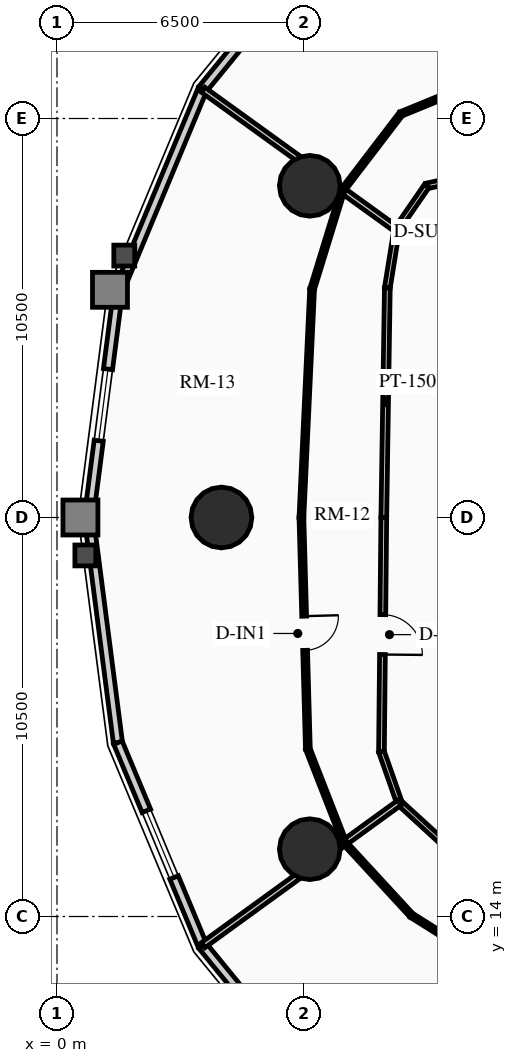
"""IFC4 building model, lengths in metres.
Left out: names, types, materials, properties, quantities, classifications, styles, units other than length and angle.
Written with IfcOpenShell. Run it as: python <this file> out.ifc"""

import sys

from ifc_helpers import new_model, si_unit, direction, frame, frame_2d, origin, origin_2d, place, context, subcontext, project, spatial, rectangle, circle, extrude, source, transform, mapped, element, fill, save


model = new_model("IFC4")
c1 = context("Model", 3, precision=1e-05, world=origin(), true_north=direction((0.0, 1.0)))
c2 = subcontext(c1, "Body", "Model", "MODEL_VIEW")
j1 = project(units=[si_unit("LENGTHUNIT", "METRE"), si_unit("PLANEANGLEUNIT", "RADIAN")], contexts=[c1])
p1 = place(None, origin())
s1 = spatial("IfcSite", under=j1, at=p1, CompositionType="ELEMENT")
p2 = place(p1, origin())
s2 = spatial("IfcBuilding", under=s1, at=p2, CompositionType="ELEMENT")
p3 = place(p2, frame((0.0, 0.0, 56.92)))
s3 = spatial("IfcBuildingStorey", under=s2, at=p3, CompositionType="ELEMENT", Elevation=56.92)
for number, where, z_axis, x_axis in (
    (1, (6.653, 33.229, 0.0), (0.0, 0.0, 1.0), (1.0, 0.0, 0.0)),
    (2, (4.328, 24.5, 0.0), (0.0, 0.0, 1.0), (1.0, 0.0, 0.0)),
    (3, (6.653, 15.771, 0.0), (0.0, 0.0, 1.0), (1.0, 0.0, 0.0)),
):
    element("IfcColumn", number, at=place(p3, frame(where, z_axis=z_axis, x_axis=x_axis)), inside=s3, PredefinedType="USERDEFINED", context=c2, shape_type="SweptSolid", body=[
        extrude(circle(Radius=0.8, at=origin_2d()), origin(), (0.0, 0.0, 1.0), 2.91),
    ])
p4 = place(p3, frame((3.828, 35.768, 0.0), z_axis=(0.0, 0.0, 1.0), x_axis=(0.632713287022, 0.77438614168, 0.0)))
e4 = element("IfcWall", 4, at=p4, inside=s3, PredefinedType="SOLIDWALL", context=c2, shape_type="SweptSolid", body=[
    extrude(rectangle(XDim=5.477, YDim=0.24, at=frame_2d((2.738, 0.0))), origin(), (0.0, 0.0, 1.0), 2.073),
])
m1 = source(origin(), c2, "Body", "SweptSolid", [
    extrude(rectangle(XDim=2.2, YDim=1.35, at=frame_2d((1.1, 0.675))), frame((0.0, 0.13, 0.0), z_axis=(0.0, -1.0, 0.0), x_axis=(1.0, 0.0, 0.0)), (0.0, 0.0, 1.0), 0.26),
])
p5 = place(p4, frame((1.638, 0.0, 0.65)))
e5 = element("IfcOpeningElement", 5, at=p5, cuts=e4, PredefinedType="OPENING", context=c2, shape_type="MappedRepresentation", body=[
    mapped(m1, transform((0.0, 0.0, 0.0), x_axis=(1.0, 0.0, 0.0), y_axis=(0.0, 1.0, 0.0), z_axis=(0.0, 0.0, 1.0), scale=1.0)),
])
p6 = place(p3, frame((1.604, 30.424, 0.0), z_axis=(0.0, 0.0, 1.0), x_axis=(0.384348836956, 0.923187939442, 0.0)))
e6 = element("IfcWall", 6, at=p6, inside=s3, PredefinedType="SOLIDWALL", context=c2, shape_type="SweptSolid", body=[
    extrude(rectangle(XDim=5.789, YDim=0.24, at=frame_2d((2.894, 0.0))), origin(), (0.0, 0.0, 1.0), 2.073),
])
p7 = place(p3, frame((0.837, 24.5, 0.0), z_axis=(0.0, 0.0, 1.0), x_axis=(0.128339641463, 0.991730274031, 0.0)))
e7 = element("IfcWall", 7, at=p7, inside=s3, PredefinedType="SOLIDWALL", context=c2, shape_type="SweptSolid", body=[
    extrude(rectangle(XDim=5.973, YDim=0.24, at=frame_2d((2.987, 0.0))), origin(), (0.0, 0.0, 1.0), 2.073),
])
m2 = source(origin(), c2, "Body", "SweptSolid", [
    extrude(rectangle(XDim=1.9, YDim=1.35, at=frame_2d((0.95, 0.675))), frame((0.0, 0.13, 0.0), z_axis=(0.0, -1.0, 0.0), x_axis=(1.0, 0.0, 0.0)), (0.0, 0.0, 1.0), 0.26),
])
p8 = place(p7, frame((2.037, 0.0, 0.65)))
e8 = element("IfcOpeningElement", 8, at=p8, cuts=e7, PredefinedType="OPENING", context=c2, shape_type="MappedRepresentation", body=[
    mapped(m2, transform((0.0, 0.0, 0.0), x_axis=(1.0, 0.0, 0.0), y_axis=(0.0, 1.0, 0.0), z_axis=(0.0, 0.0, 1.0), scale=1.0)),
])
p9 = place(p3, frame((1.604, 18.576, 0.0), z_axis=(0.0, 0.0, 1.0), x_axis=(-0.128339641463, 0.991730274031, 0.0)))
e9 = element("IfcWall", 9, at=p9, inside=s3, PredefinedType="SOLIDWALL", context=c2, shape_type="SweptSolid", body=[
    extrude(rectangle(XDim=5.973, YDim=0.24, at=frame_2d((2.987, 0.0))), origin(), (0.0, 0.0, 1.0), 2.073),
])
p10 = place(p3, frame((3.828, 13.232, 0.0), z_axis=(0.0, 0.0, 1.0), x_axis=(-0.384348836956, 0.923187939442, 0.0)))
e10 = element("IfcWall", 10, at=p10, inside=s3, PredefinedType="SOLIDWALL", context=c2, shape_type="SweptSolid", body=[
    extrude(rectangle(XDim=5.789, YDim=0.24, at=frame_2d((2.894, 0.0))), origin(), (0.0, 0.0, 1.0), 2.073),
])
p11 = place(p10, frame((1.944, 0.0, 0.65)))
e11 = element("IfcOpeningElement", 11, at=p11, cuts=e10, PredefinedType="OPENING", context=c2, shape_type="MappedRepresentation", body=[
    mapped(m2, transform((0.0, 0.0, 0.0), x_axis=(1.0, 0.0, 0.0), y_axis=(0.0, 1.0, 0.0), z_axis=(0.0, 0.0, 1.0), scale=1.0)),
])
p12 = place(p3, frame((7.293, 8.991, 0.0), z_axis=(0.0, 0.0, 1.0), x_axis=(-0.632713287022, 0.77438614168, 0.0)))
e12 = element("IfcWall", 12, at=p12, inside=s3, PredefinedType="SOLIDWALL", context=c2, shape_type="SweptSolid", body=[
    extrude(rectangle(XDim=5.477, YDim=0.24, at=frame_2d((2.738, 0.0))), origin(), (0.0, 0.0, 1.0), 2.073),
])
p13 = place(p3, frame((11.62, 33.637, 0.0), z_axis=(0.0, 0.0, 1.0), x_axis=(-0.97702579435, -0.213121085711, 0.0)))
e13 = element("IfcWall", 13, at=p13, inside=s3, PredefinedType="PARTITIONING", context=c2, shape_type="SweptSolid", body=[
    extrude(rectangle(XDim=1.935, YDim=0.15, at=frame_2d((0.967, 0.0))), origin(), (0.0, 0.0, 1.0), 2.159),
])
m3 = source(origin(), c2, "Body", "SweptSolid", [
    extrude(rectangle(XDim=1.05, YDim=2.015, at=frame_2d((0.525, 1.007))), frame((0.0, 0.085, 0.0), z_axis=(0.0, -1.0, 0.0), x_axis=(1.0, 0.0, 0.0)), (0.0, 0.0, 1.0), 0.17),
])
p14 = place(p13, frame((0.442, 0.0, 0.0)))
e14 = element("IfcOpeningElement", 14, at=p14, cuts=e13, PredefinedType="OPENING", context=c2, shape_type="MappedRepresentation", body=[
    mapped(m3, transform((0.0, 0.0, 0.0), x_axis=(1.0, 0.0, 0.0), y_axis=(0.0, 1.0, 0.0), z_axis=(0.0, 0.0, 1.0), scale=1.0)),
])
p15 = place(p3, frame((9.729, 33.225, 0.0), z_axis=(0.0, 0.0, 1.0), x_axis=(-0.567183649484, -0.82359134755, 0.0)))
e15 = element("IfcWall", 15, at=p15, inside=s3, PredefinedType="PARTITIONING", context=c2, shape_type="SweptSolid", body=[
    extrude(rectangle(XDim=1.392, YDim=0.15, at=frame_2d((0.696, 0.0))), origin(), (0.0, 0.0, 1.0), 2.159),
])
p16 = place(p3, frame((8.94, 32.078, 0.0), z_axis=(0.0, 0.0, 1.0), x_axis=(-0.159148467753, -0.98725466077, 0.0)))
e16 = element("IfcWall", 16, at=p16, inside=s3, PredefinedType="PARTITIONING", context=c2, shape_type="SweptSolid", body=[
    extrude(rectangle(XDim=1.554, YDim=0.15, at=frame_2d((0.777, 0.0))), origin(), (0.0, 0.0, 1.0), 2.205),
])
p17 = place(p3, frame((8.693, 30.544, 0.0), z_axis=(0.0, 0.0, 1.0), x_axis=(-0.015307007986, -0.99988284089, 0.0)))
e17 = element("IfcWall", 17, at=p17, inside=s3, PredefinedType="PARTITIONING", context=c2, shape_type="SweptSolid", body=[
    extrude(rectangle(XDim=6.045, YDim=0.15, at=frame_2d((3.022, 0.0))), origin(), (0.0, 0.0, 1.0), 2.635),
])
p18 = place(p3, frame((8.6, 24.5, 0.0), z_axis=(0.0, 0.0, 1.0), x_axis=(-0.010023665349, -0.999949761805, 0.0)))
e18 = element("IfcWall", 18, at=p18, inside=s3, PredefinedType="PARTITIONING", context=c2, shape_type="SweptSolid", body=[
    extrude(rectangle(XDim=6.162, YDim=0.15, at=frame_2d((3.081, 0.0))), origin(), (0.0, 0.0, 1.0), 2.159),
])
p19 = place(p18, frame((2.556, 0.0, 0.0)))
e19 = element("IfcOpeningElement", 19, at=p19, cuts=e18, PredefinedType="OPENING", context=c2, shape_type="MappedRepresentation", body=[
    mapped(m3, transform((0.0, 0.0, 0.0), x_axis=(1.0, 0.0, 0.0), y_axis=(0.0, 1.0, 0.0), z_axis=(0.0, 0.0, 1.0), scale=1.0)),
])
p20 = place(p3, frame((8.538, 18.338, 0.0), z_axis=(0.0, 0.0, 1.0), x_axis=(0.331358150167, -0.94350504838, 0.0)))
e20 = element("IfcWall", 20, at=p20, inside=s3, PredefinedType="PARTITIONING", context=c2, shape_type="SweptSolid", body=[
    extrude(rectangle(XDim=1.424, YDim=0.15, at=frame_2d((0.712, 0.0))), origin(), (0.0, 0.0, 1.0), 2.205),
])
p21 = place(p3, frame((9.01, 16.994, 0.0), z_axis=(0.0, 0.0, 1.0), x_axis=(0.737701798986, -0.67512669609, 0.0)))
e21 = element("IfcWall", 21, at=p21, inside=s3, PredefinedType="PARTITIONING", context=c2, shape_type="SweptSolid", body=[
    extrude(rectangle(XDim=1.498, YDim=0.15, at=frame_2d((0.749, 0.0))), origin(), (0.0, 0.0, 1.0), 2.159),
])
p22 = place(p3, frame((8.94, 32.078, 0.0), z_axis=(0.0, 0.0, 1.0), x_axis=(-0.810854375189, 0.585247966453, 0.0)))
e22 = element("IfcWall", 22, at=p22, inside=s3, PredefinedType="PARTITIONING", context=c2, shape_type="SweptSolid", body=[
    extrude(rectangle(XDim=6.284, YDim=0.16, at=frame_2d((3.142, 0.0))), origin(), (0.0, 0.0, 1.0), 2.073),
])
p23 = place(p3, frame((9.01, 16.994, 0.0), z_axis=(0.0, 0.0, 1.0), x_axis=(-0.809215422166, -0.58751204288, 0.0)))
e23 = element("IfcWall", 23, at=p23, inside=s3, PredefinedType="PARTITIONING", context=c2, shape_type="SweptSolid", body=[
    extrude(rectangle(XDim=6.384, YDim=0.16, at=frame_2d((3.192, 0.0))), origin(), (0.0, 0.0, 1.0), 2.073),
])
p24 = place(p3, frame((11.633, 36.178, 0.0), z_axis=(0.0, 0.0, 1.0), x_axis=(-0.92528752303, -0.379266396779, 0.0)))
e24 = element("IfcWall", 24, at=p24, inside=s3, PredefinedType="PARTITIONING", context=c2, shape_type="SweptSolid", body=[
    extrude(rectangle(XDim=2.791, YDim=0.125, at=frame_2d((1.395, 0.0))), origin(), (0.0, 0.0, 1.0), 2.205),
])
p25 = place(p3, frame((9.051, 35.12, 0.0), z_axis=(0.0, 0.0, 1.0), x_axis=(-0.607256827378, -0.79450559822, 0.0)))
e25 = element("IfcWall", 25, at=p25, inside=s3, PredefinedType="PARTITIONING", context=c2, shape_type="SweptSolid", body=[
    extrude(rectangle(XDim=2.532, YDim=0.125, at=frame_2d((1.266, 0.0))), origin(), (0.0, 0.0, 1.0), 2.073),
])
p26 = place(p3, frame((7.513, 33.108, 0.0), z_axis=(0.0, 0.0, 1.0), x_axis=(-0.294167851511, -0.955753773279, 0.0)))
e26 = element("IfcWall", 26, at=p26, inside=s3, PredefinedType="PARTITIONING", context=c2, shape_type="SweptSolid", body=[
    extrude(rectangle(XDim=2.72, YDim=0.125, at=frame_2d((1.36, 0.0))), origin(), (0.0, 0.0, 1.0), 2.159),
])
p27 = place(p3, frame((6.713, 30.509, 0.0), z_axis=(0.0, 0.0, 1.0), x_axis=(-0.046755247216, -0.998906375422, 0.0)))
e27 = element("IfcWall", 27, at=p27, inside=s3, PredefinedType="PARTITIONING", context=c2, shape_type="SweptSolid", body=[
    extrude(rectangle(XDim=6.015, YDim=0.125, at=frame_2d((3.008, 0.0))), origin(), (0.0, 0.0, 1.0), 2.635),
])
p28 = place(p3, frame((6.432, 24.5, 0.0), z_axis=(0.0, 0.0, 1.0), x_axis=(0.027874896751, -0.999611419568, 0.0)))
e28 = element("IfcWall", 28, at=p28, inside=s3, PredefinedType="PARTITIONING", context=c2, shape_type="SweptSolid", body=[
    extrude(rectangle(XDim=6.096, YDim=0.125, at=frame_2d((3.048, 0.0))), origin(), (0.0, 0.0, 1.0), 2.159),
])
m4 = source(origin(), c2, "Body", "SweptSolid", [
    extrude(rectangle(XDim=0.9, YDim=2.005, at=frame_2d((0.45, 1.002))), frame((0.0, 0.073, 0.0), z_axis=(0.0, -1.0, 0.0), x_axis=(1.0, 0.0, 0.0)), (0.0, 0.0, 1.0), 0.145),
])
p29 = place(p28, frame((2.598, 0.0, 0.0)))
e29 = element("IfcOpeningElement", 29, at=p29, cuts=e28, PredefinedType="OPENING", context=c2, shape_type="MappedRepresentation", body=[
    mapped(m4, transform((0.0, 0.0, 0.0), x_axis=(1.0, 0.0, 0.0), y_axis=(0.0, 1.0, 0.0), z_axis=(0.0, 0.0, 1.0), scale=1.0)),
])
p30 = place(p3, frame((6.602, 18.406, 0.0), z_axis=(0.0, 0.0, 1.0), x_axis=(0.363943166681, -0.931421156849, 0.0)))
e30 = element("IfcWall", 30, at=p30, inside=s3, PredefinedType="PARTITIONING", context=c2, shape_type="SweptSolid", body=[
    extrude(rectangle(XDim=2.644, YDim=0.125, at=frame_2d((1.322, 0.0))), origin(), (0.0, 0.0, 1.0), 2.159),
])
p31 = place(p3, frame((7.564, 15.944, 0.0), z_axis=(0.0, 0.0, 1.0), x_axis=(0.677781429023, -0.735263445624, 0.0)))
e31 = element("IfcWall", 31, at=p31, inside=s3, PredefinedType="PARTITIONING", context=c2, shape_type="SweptSolid", body=[
    extrude(rectangle(XDim=2.604, YDim=0.125, at=frame_2d((1.302, 0.0))), origin(), (0.0, 0.0, 1.0), 2.635),
])
p32 = place(p3, frame((9.329, 14.03, 0.0), z_axis=(0.0, 0.0, 1.0), x_axis=(0.846499184235, -0.532390017834, 0.0)))
e32 = element("IfcWall", 32, at=p32, inside=s3, PredefinedType="PARTITIONING", context=c2, shape_type="SweptSolid", body=[
    extrude(rectangle(XDim=2.586, YDim=0.125, at=frame_2d((1.293, 0.0))), origin(), (0.0, 0.0, 1.0), 2.205),
])
m5 = source(origin(), c2, "Body", "SweptSolid", [
    extrude(rectangle(XDim=1.9, YDim=1.35, at=frame_2d((0.95, 0.675))), frame((0.0, 0.03, 0.0), z_axis=(0.0, -1.0, 0.0), x_axis=(1.0, 0.0, 0.0)), (0.0, 0.0, 1.0), 0.06),
])
p33 = place(p8, origin())
e33 = element("IfcWindow", 33, at=p33, inside=s3, PartitioningType="DOUBLE_PANEL_VERTICAL", PredefinedType="WINDOW", context=c2, shape_type="MappedRepresentation", body=[
    mapped(m5, transform((0.0, 0.0, 0.0), x_axis=(1.0, 0.0, 0.0), y_axis=(0.0, 1.0, 0.0), z_axis=(0.0, 0.0, 1.0), scale=1.0)),
])
fill(e8, e33)
p34 = place(p11, origin())
e34 = element("IfcWindow", 34, at=p34, inside=s3, PartitioningType="DOUBLE_PANEL_VERTICAL", PredefinedType="WINDOW", context=c2, shape_type="MappedRepresentation", body=[
    mapped(m5, transform((0.0, 0.0, 0.0), x_axis=(1.0, 0.0, 0.0), y_axis=(0.0, 1.0, 0.0), z_axis=(0.0, 0.0, 1.0), scale=1.0)),
])
fill(e11, e34)
m6 = source(origin(), c2, "Body", "SweptSolid", [
    extrude(rectangle(XDim=1.05, YDim=2.015, at=frame_2d((0.525, 1.007))), frame((0.0, 0.025, 0.0), z_axis=(0.0, -1.0, 0.0), x_axis=(1.0, 0.0, 0.0)), (0.0, 0.0, 1.0), 0.05),
])
p35 = place(p19, origin())
e35 = element("IfcDoor", 35, at=p35, inside=s3, OperationType="SINGLE_SWING_RIGHT", PredefinedType="DOOR", context=c2, shape_type="MappedRepresentation", body=[
    mapped(m6, transform((0.0, 0.0, 0.0), x_axis=(1.0, 0.0, 0.0), y_axis=(0.0, 1.0, 0.0), z_axis=(0.0, 0.0, 1.0), scale=1.0)),
])
fill(e19, e35)
m7 = source(origin(), c2, "Body", "SweptSolid", [
    extrude(rectangle(XDim=0.9, YDim=2.005, at=frame_2d((0.45, 1.002))), frame((0.0, 0.025, 0.0), z_axis=(0.0, -1.0, 0.0), x_axis=(1.0, 0.0, 0.0)), (0.0, 0.0, 1.0), 0.05),
])
p36 = place(p29, origin())
e36 = element("IfcDoor", 36, at=p36, inside=s3, OperationType="SINGLE_SWING_LEFT", PredefinedType="DOOR", context=c2, shape_type="MappedRepresentation", body=[
    mapped(m7, transform((0.0, 0.0, 0.0), x_axis=(1.0, 0.0, 0.0), y_axis=(0.0, 1.0, 0.0), z_axis=(0.0, 0.0, 1.0), scale=1.0)),
])
fill(e29, e36)
save(model, sys.argv[1])
